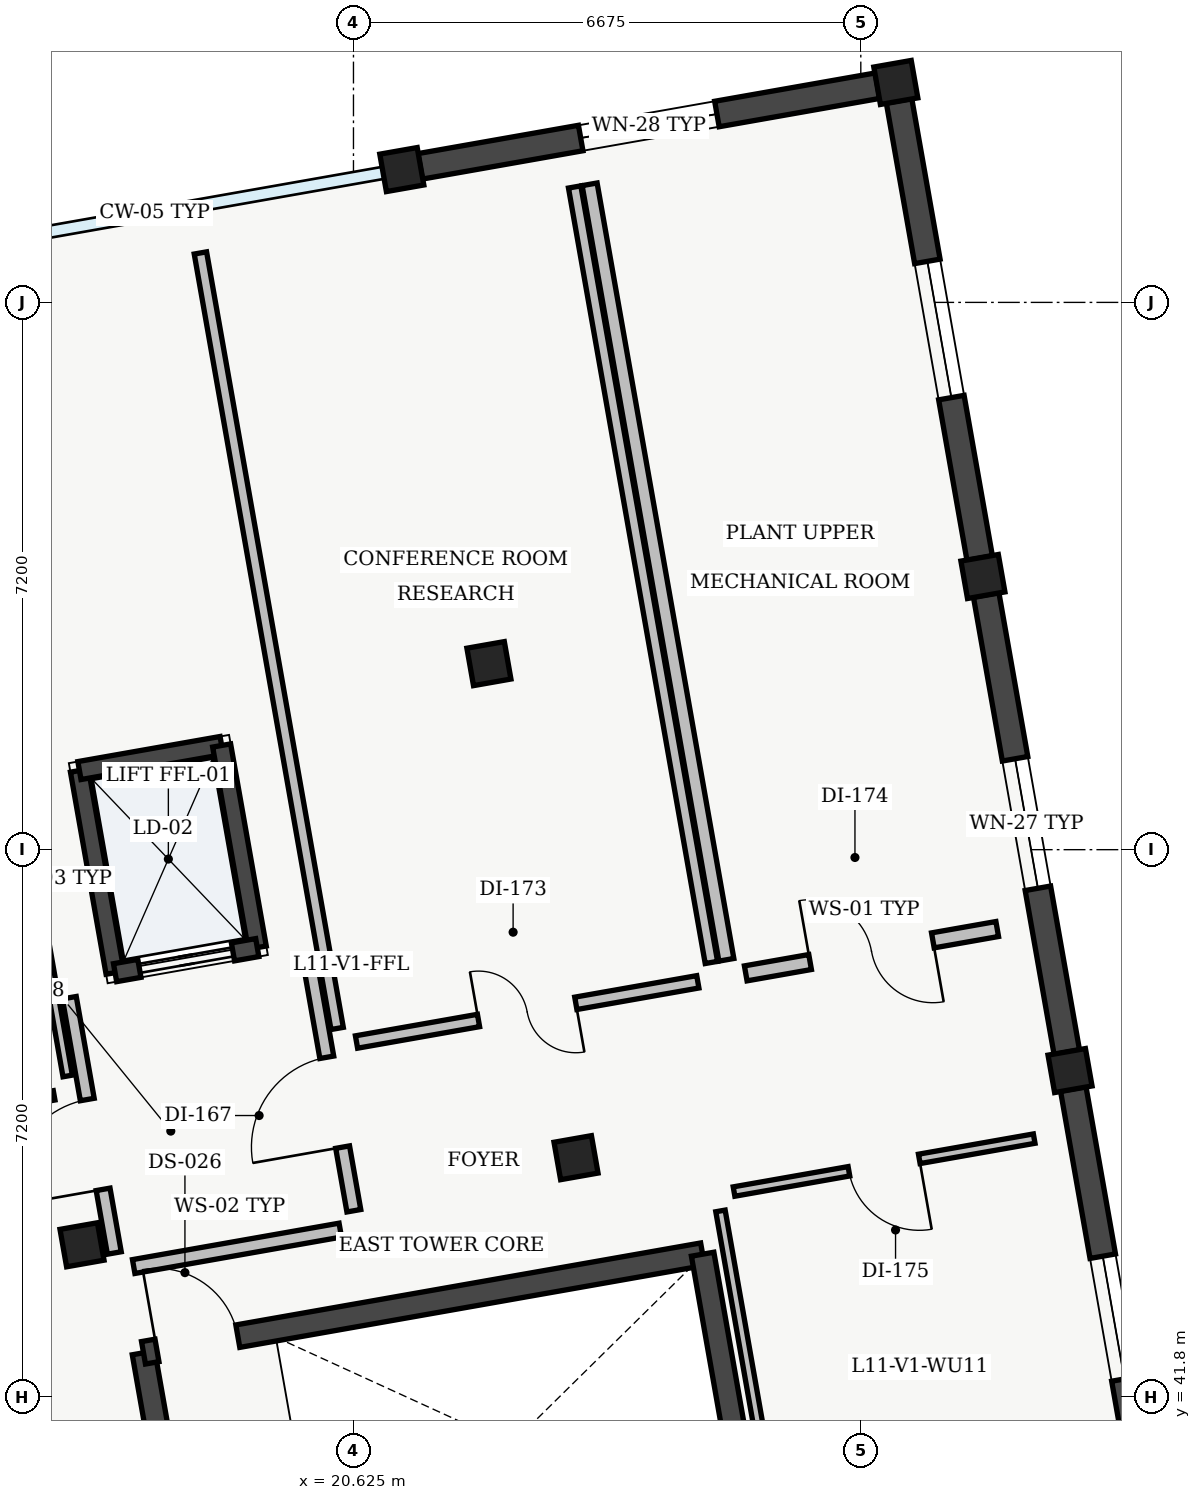
"""IFC4 building model, lengths in metres.
Left out: names, types, materials, properties, quantities, classifications, styles, units other than length and angle.
Written with IfcOpenShell. Run it as: python <this file> out.ifc"""

import sys

from ifc_helpers import new_model, si_unit, direction, frame, frame_2d, origin, origin_2d, place, context, subcontext, project, spatial, polyline, rectangle, outline, extrude, element, fill, save


model = new_model("IFC4")
c1 = context("Model", 3, precision=1e-05, world=origin(), true_north=direction((0.0, 1.0)))
c2 = subcontext(c1, "Body", "Model", "MODEL_VIEW")
j1 = project(units=[si_unit("LENGTHUNIT", "METRE"), si_unit("PLANEANGLEUNIT", "RADIAN")], contexts=[c1])
p1 = place(None, origin())
s1 = spatial("IfcSite", under=j1, at=p1, CompositionType="ELEMENT")
p2 = place(p1, origin())
s2 = spatial("IfcBuilding", under=s1, at=p2, CompositionType="ELEMENT")
p3 = place(p2, frame((0.0, 0.0, 49.2)))
s3 = spatial("IfcBuildingStorey", under=s2, at=p3, CompositionType="ELEMENT", Elevation=49.2)
for number, where, z_axis, x_axis in (
    (1, (17.053, 43.802, 0.0), (0.0, 0.0, 1.0), (0.985, 0.174, 0.0)),
    (2, (23.553, 44.948, 0.0), (0.0, 0.0, 1.0), (0.985, 0.174, 0.0)),
    (3, (22.407, 51.448, 0.0), (0.0, 0.0, 1.0), (0.985, 0.174, 0.0)),
    (4, (21.261, 57.948, 0.0), (0.0, 0.0, 1.0), (0.985, 0.174, 0.0)),
    (5, (30.053, 46.094, 0.0), (0.0, 0.0, 1.0), (0.985, 0.174, 0.0)),
    (6, (28.907, 52.594, 0.0), (0.0, 0.0, 1.0), (0.985, 0.174, 0.0)),
    (7, (27.761, 59.094, 0.0), (0.0, 0.0, 1.0), (0.985, 0.174, 0.0)),
):
    element("IfcColumn", number, at=place(p3, frame(where, z_axis=z_axis, x_axis=x_axis)), inside=s3, PredefinedType="COLUMN", context=c2, shape_type="SweptSolid", body=[
        extrude(rectangle(XDim=0.5, YDim=0.5, at=origin_2d()), origin(), (0.0, 0.0, 1.0), 4.2),
    ])
p4 = place(p3, frame((21.502, 57.99, 0.0), z_axis=(0.0, 0.0, 1.0), x_axis=(0.984807282173, 0.173650847905, 0.0)))
e8 = element("IfcWall", 8, at=p4, inside=s3, PredefinedType="SOLIDWALL", context=c2, shape_type="SweptSolid", body=[
    extrude(rectangle(XDim=6.11, YDim=0.34, at=frame_2d((3.055, 0.0))), origin(), (0.0, 0.0, 1.0), 7.42),
])
p5 = place(p4, frame((2.145, 0.0, 0.95)))
e9 = element("IfcOpeningElement", 9, at=p5, cuts=e8, PredefinedType="OPENING", context=c2, shape_type="SweptSolid", body=[
    extrude(rectangle(XDim=1.82, YDim=1.38, at=frame_2d((0.91, 0.69))), frame((0.0, 0.17, 0.0), z_axis=(0.0, -1.0, 0.0), x_axis=(1.0, 0.0, 0.0)), (0.0, 0.0, 1.0), 0.34),
])
p6 = place(p3, frame((27.803, 58.852, 0.0), z_axis=(0.0, 0.0, 1.0), x_axis=(0.173650847905, -0.984807282173, 0.0)))
e10 = element("IfcWall", 10, at=p6, inside=s3, PredefinedType="SOLIDWALL", context=c2, shape_type="SweptSolid", body=[
    extrude(outline(polyline([(0.0, 0.0), (6.11, 0.0), (6.11, 6.666), (0.0, 7.901), (0.0, 0.0)])), frame((0.0, 0.17, 0.0), z_axis=(0.0, -1.0, 0.0), x_axis=(1.0, 0.0, 0.0)), (0.0, 0.0, 1.0), 0.34),
])
p7 = place(p6, frame((2.145, 0.0, 0.95)))
e11 = element("IfcOpeningElement", 11, at=p7, cuts=e10, PredefinedType="OPENING", context=c2, shape_type="SweptSolid", body=[
    extrude(rectangle(XDim=1.82, YDim=1.38, at=frame_2d((0.91, 0.69))), frame((0.0, 0.17, 0.0), z_axis=(0.0, -1.0, 0.0), x_axis=(1.0, 0.0, 0.0)), (0.0, 0.0, 1.0), 0.34),
])
p8 = place(p3, frame((28.949, 52.353, 0.0), z_axis=(0.0, 0.0, 1.0), x_axis=(0.173650847905, -0.984807282173, 0.0)))
e12 = element("IfcWall", 12, at=p8, inside=s3, PredefinedType="SOLIDWALL", context=c2, shape_type="SweptSolid", body=[
    extrude(outline(polyline([(0.0, 0.0), (6.11, 0.0), (6.11, 5.333), (0.0, 6.567), (0.0, 0.0)])), frame((0.0, 0.17, 0.0), z_axis=(0.0, -1.0, 0.0), x_axis=(1.0, 0.0, 0.0)), (0.0, 0.0, 1.0), 0.34),
])
p9 = place(p8, frame((2.19, 0.0, 0.95)))
e13 = element("IfcOpeningElement", 13, at=p9, cuts=e12, PredefinedType="OPENING", context=c2, shape_type="SweptSolid", body=[
    extrude(rectangle(XDim=1.73, YDim=1.36, at=frame_2d((0.865, 0.68))), frame((0.0, 0.17, 0.0), z_axis=(0.0, -1.0, 0.0), x_axis=(1.0, 0.0, 0.0)), (0.0, 0.0, 1.0), 0.34),
])
p10 = place(p3, frame((30.095, 45.853, 0.0), z_axis=(0.0, 0.0, 1.0), x_axis=(0.173657681232, -0.98480607723, 0.0)))
e14 = element("IfcWall", 14, at=p10, inside=s3, PredefinedType="SOLIDWALL", context=c2, shape_type="SweptSolid", body=[
    extrude(outline(polyline([(0.0, 0.0), (6.11, 0.0), (6.11, 4.0), (0.0, 5.234), (0.0, 0.0)])), frame((0.0, 0.17, 0.0), z_axis=(0.0, -1.0, 0.0), x_axis=(1.0, 0.0, 0.0)), (0.0, 0.0, 1.0), 0.34),
])
p11 = place(p10, frame((2.235, 0.0, 0.95)))
e15 = element("IfcOpeningElement", 15, at=p11, cuts=e14, PredefinedType="OPENING", context=c2, shape_type="SweptSolid", body=[
    extrude(rectangle(XDim=1.64, YDim=1.48, at=frame_2d((0.82, 0.74))), frame((0.0, 0.17, 0.0), z_axis=(0.0, -1.0, 0.0), x_axis=(1.0, 0.0, 0.0)), (0.0, 0.0, 1.0), 0.34),
])
p12 = place(p3, frame((18.567, 38.383, 0.0), z_axis=(0.0, 0.0, 1.0), x_axis=(-0.173606946886, 0.984815022221, 0.0)))
e16 = element("IfcWall", 16, at=p12, inside=s3, PredefinedType="SHEAR", context=c2, shape_type="SweptSolid", body=[
    extrude(rectangle(XDim=4.06, YDim=0.3, at=frame_2d((2.03, 0.0))), origin(), (0.0, 0.0, 1.0), 3.98),
])
p13 = place(p3, frame((17.863, 42.381, 0.0), z_axis=(0.0, 0.0, 1.0), x_axis=(0.984808225754, 0.173645496596, 0.0)))
e17 = element("IfcWall", 17, at=p13, inside=s3, PredefinedType="SHEAR", context=c2, shape_type="SweptSolid", body=[
    extrude(rectangle(XDim=7.47, YDim=0.3, at=frame_2d((3.735, 0.0))), origin(), (0.0, 0.0, 1.0), 3.98),
])
p14 = place(p13, frame((0.18, 0.0, 0.0)))
e18 = element("IfcOpeningElement", 18, at=p14, cuts=e17, PredefinedType="OPENING", context=c2, shape_type="SweptSolid", body=[
    extrude(rectangle(XDim=1.08, YDim=2.15, at=frame_2d((0.54, 1.075))), frame((0.0, 0.15, 0.0), z_axis=(0.0, -1.0, 0.0), x_axis=(1.0, 0.0, 0.0)), (0.0, 0.0, 1.0), 0.3),
])
p15 = place(p3, frame((25.219, 43.678, 0.0), z_axis=(0.0, 0.0, 1.0), x_axis=(0.173665267602, -0.984804739443, 0.0)))
e19 = element("IfcWall", 19, at=p15, inside=s3, PredefinedType="SHEAR", context=c2, shape_type="SweptSolid", body=[
    extrude(rectangle(XDim=4.06, YDim=0.3, at=frame_2d((2.03, 0.0))), origin(), (0.0, 0.0, 1.0), 3.98),
])
p16 = place(p3, frame((17.488, 47.382, 0.0), z_axis=(0.0, 0.0, 1.0), x_axis=(-0.173615102578, 0.98481358447, 0.0)))
e20 = element("IfcWall", 20, at=p16, inside=s3, PredefinedType="SHEAR", context=c2, shape_type="SweptSolid", body=[
    extrude(rectangle(XDim=2.7, YDim=0.24, at=frame_2d((1.35, 0.0))), origin(), (0.0, 0.0, 1.0), 4.35),
])
p17 = place(p3, frame((17.02, 50.041, 0.0), z_axis=(0.0, 0.0, 1.0), x_axis=(0.984815882103, 0.173602068988, 0.0)))
e21 = element("IfcWall", 21, at=p17, inside=s3, PredefinedType="SHEAR", context=c2, shape_type="SweptSolid", body=[
    extrude(rectangle(XDim=1.9, YDim=0.24, at=frame_2d((0.95, 0.0))), origin(), (0.0, 0.0, 1.0), 4.35),
])
p18 = place(p3, frame((18.891, 50.371, 0.0), z_axis=(0.0, 0.0, 1.0), x_axis=(0.173615102578, -0.98481358447, 0.0)))
e22 = element("IfcWall", 22, at=p18, inside=s3, PredefinedType="SHEAR", context=c2, shape_type="SweptSolid", body=[
    extrude(rectangle(XDim=2.7, YDim=0.24, at=frame_2d((1.35, 0.0))), origin(), (0.0, 0.0, 1.0), 4.35),
])
p19 = place(p3, frame((19.359, 47.712, 0.0), z_axis=(0.0, 0.0, 1.0), x_axis=(-0.984815882103, -0.173602068988, 0.0)))
e23 = element("IfcWall", 23, at=p19, inside=s3, PredefinedType="SHEAR", context=c2, shape_type="SweptSolid", body=[
    extrude(rectangle(XDim=1.9, YDim=0.24, at=frame_2d((0.95, 0.0))), origin(), (0.0, 0.0, 1.0), 4.35),
])
p20 = place(p19, frame((0.325, 0.0, 0.0)))
e24 = element("IfcOpeningElement", 24, at=p20, cuts=e23, PredefinedType="OPENING", context=c2, shape_type="SweptSolid", body=[
    extrude(rectangle(XDim=1.25, YDim=2.2, at=frame_2d((0.625, 1.1))), frame((0.0, 0.12, 0.0), z_axis=(0.0, -1.0, 0.0), x_axis=(1.0, 0.0, 0.0)), (0.0, 0.0, 1.0), 0.24),
])
p21 = place(p3, frame((17.733, 43.516, 0.0), z_axis=(0.0, 0.0, 1.0), x_axis=(0.984808483292, 0.173644035992, 0.0)))
e25 = element("IfcWall", 25, at=p21, inside=s3, PredefinedType="SOLIDWALL", context=c2, shape_type="SweptSolid", body=[
    extrude(rectangle(XDim=2.76, YDim=0.185, at=frame_2d((1.38, 0.0))), origin(), (0.0, 0.0, 1.0), 3.65),
])
p22 = place(p3, frame((20.63, 44.25, 0.0), z_axis=(0.0, 0.0, 1.0), x_axis=(-0.173621956536, 0.984812376145, 0.0)))
e26 = element("IfcWall", 26, at=p22, inside=s3, PredefinedType="SOLIDWALL", context=c2, shape_type="SweptSolid", body=[
    extrude(rectangle(XDim=3.41, YDim=0.185, at=frame_2d((1.705, 0.0))), origin(), (0.0, 0.0, 1.0), 3.65),
])
p23 = place(p22, frame((0.85, 0.0, 0.0)))
e27 = element("IfcOpeningElement", 27, at=p23, cuts=e26, PredefinedType="OPENING", context=c2, shape_type="SweptSolid", body=[
    extrude(rectangle(XDim=1.2, YDim=2.15, at=frame_2d((0.6, 1.075))), frame((0.0, 0.093, 0.0), z_axis=(0.0, -1.0, 0.0), x_axis=(1.0, 0.0, 0.0)), (0.0, 0.0, 1.0), 0.185),
])
p24 = place(p3, frame((16.886, 47.052, 0.0), z_axis=(0.0, 0.0, 1.0), x_axis=(0.173621956536, -0.984812376145, 0.0)))
e28 = element("IfcWall", 28, at=p24, inside=s3, PredefinedType="SOLIDWALL", context=c2, shape_type="SweptSolid", body=[
    extrude(rectangle(XDim=3.41, YDim=0.185, at=frame_2d((1.705, 0.0))), origin(), (0.0, 0.0, 1.0), 3.65),
])
p25 = place(p24, frame((1.36, 0.0, 0.0)))
e29 = element("IfcOpeningElement", 29, at=p25, cuts=e28, PredefinedType="OPENING", context=c2, shape_type="SweptSolid", body=[
    extrude(rectangle(XDim=1.2, YDim=2.15, at=frame_2d((0.6, 1.075))), frame((0.0, 0.093, 0.0), z_axis=(0.0, -1.0, 0.0), x_axis=(1.0, 0.0, 0.0)), (0.0, 0.0, 1.0), 0.185),
])
p26 = place(p3, frame((10.423, 44.664, 0.0), z_axis=(0.0, 0.0, 1.0), x_axis=(0.984804420334, 0.173667077165, 0.0)))
e30 = element("IfcWall", 30, at=p26, inside=s3, PredefinedType="PARTITIONING", context=c2, shape_type="SweptSolid", body=[
    extrude(rectangle(XDim=6.36, YDim=0.125, at=frame_2d((3.18, 0.0))), origin(), (0.0, 0.0, 1.0), 3.65),
])
p27 = place(p26, frame((2.71, 0.0, 0.0)))
e31 = element("IfcOpeningElement", 31, at=p27, cuts=e30, PredefinedType="OPENING", context=c2, shape_type="SweptSolid", body=[
    extrude(rectangle(XDim=0.94, YDim=2.12, at=frame_2d((0.47, 1.06))), frame((0.0, 0.062, 0.0), z_axis=(0.0, -1.0, 0.0), x_axis=(1.0, 0.0, 0.0)), (0.0, 0.0, 1.0), 0.125),
])
p28 = place(p3, frame((16.865, 46.023, 0.0), z_axis=(0.0, 0.0, 1.0), x_axis=(-0.173632075677, 0.984810592092, 0.0)))
e32 = element("IfcWall", 32, at=p28, inside=s3, PredefinedType="PARTITIONING", context=c2, shape_type="SweptSolid", body=[
    extrude(rectangle(XDim=10.36, YDim=0.125, at=frame_2d((5.18, 0.0))), origin(), (0.0, 0.0, 1.0), 3.37),
])
p29 = place(p3, frame((20.665, 46.469, 0.0), z_axis=(0.0, 0.0, 1.0), x_axis=(0.984801878875, 0.173681488261, 0.0)))
e33 = element("IfcWall", 33, at=p29, inside=s3, PredefinedType="PARTITIONING", context=c2, shape_type="SweptSolid", body=[
    extrude(rectangle(XDim=4.56, YDim=0.165, at=frame_2d((2.28, 0.0))), origin(), (0.0, 0.0, 1.0), 3.65),
])
p30 = place(p29, frame((1.63, 0.0, 0.0)))
e34 = element("IfcOpeningElement", 34, at=p30, cuts=e33, PredefinedType="OPENING", context=c2, shape_type="SweptSolid", body=[
    extrude(rectangle(XDim=1.3, YDim=2.18, at=frame_2d((0.65, 1.09))), frame((0.0, 0.083, 0.0), z_axis=(0.0, -1.0, 0.0), x_axis=(1.0, 0.0, 0.0)), (0.0, 0.0, 1.0), 0.165),
])
p31 = place(p3, frame((25.334, 47.516, 0.0), z_axis=(0.0, 0.0, 1.0), x_axis=(-0.173658960975, 0.984805851563, 0.0)))
e35 = element("IfcWall", 35, at=p31, inside=s3, PredefinedType="PARTITIONING", context=c2, shape_type="SweptSolid", body=[
    extrude(rectangle(XDim=10.36, YDim=0.165, at=frame_2d((5.18, 0.0))), origin(), (0.0, 0.0, 1.0), 3.65),
])
p32 = place(p3, frame((18.611, 56.851, 0.0), z_axis=(0.0, 0.0, 1.0), x_axis=(0.173654930775, -0.984806562233, 0.0)))
e36 = element("IfcWall", 36, at=p32, inside=s3, PredefinedType="PARTITIONING", context=c2, shape_type="SweptSolid", body=[
    extrude(rectangle(XDim=10.36, YDim=0.165, at=frame_2d((5.18, 0.0))), origin(), (0.0, 0.0, 1.0), 3.65),
])
p33 = place(p3, frame((25.786, 47.373, 0.0), z_axis=(0.0, 0.0, 1.0), x_axis=(0.984804765243, 0.173665121296, 0.0)))
e37 = element("IfcWall", 37, at=p33, inside=s3, PredefinedType="SOLIDWALL", context=c2, shape_type="SweptSolid", body=[
    extrude(rectangle(XDim=3.36, YDim=0.2, at=frame_2d((1.68, 0.0))), origin(), (0.0, 0.0, 1.0), 3.65),
])
p34 = place(p33, frame((0.86, 0.0, 0.0)))
e38 = element("IfcOpeningElement", 38, at=p34, cuts=e37, PredefinedType="OPENING", context=c2, shape_type="SweptSolid", body=[
    extrude(rectangle(XDim=1.64, YDim=2.2, at=frame_2d((0.82, 1.1))), frame((0.0, 0.1, 0.0), z_axis=(0.0, -1.0, 0.0), x_axis=(1.0, 0.0, 0.0)), (0.0, 0.0, 1.0), 0.2),
])
p35 = place(p3, frame((23.732, 57.754, 0.0), z_axis=(0.0, 0.0, 1.0), x_axis=(0.173654930775, -0.984806562233, 0.0)))
e39 = element("IfcWall", 39, at=p35, inside=s3, PredefinedType="SOLIDWALL", context=c2, shape_type="SweptSolid", body=[
    extrude(rectangle(XDim=10.36, YDim=0.2, at=frame_2d((5.18, 0.0))), origin(), (0.0, 0.0, 1.0), 3.65),
])
p36 = place(p3, frame((29.581, 45.198, 0.0), z_axis=(0.0, 0.0, 1.0), x_axis=(-0.984810514369, -0.173632516505, 0.0)))
e40 = element("IfcWall", 40, at=p36, inside=s3, PredefinedType="PARTITIONING", context=c2, shape_type="SweptSolid", body=[
    extrude(rectangle(XDim=4.01, YDim=0.125, at=frame_2d((2.005, 0.0))), origin(), (0.0, 0.0, 1.0), 3.65),
])
p37 = place(p36, frame((1.535, 0.0, 0.0)))
e41 = element("IfcOpeningElement", 41, at=p37, cuts=e40, PredefinedType="OPENING", context=c2, shape_type="SweptSolid", body=[
    extrude(rectangle(XDim=0.94, YDim=2.12, at=frame_2d((0.47, 1.06))), frame((0.0, 0.062, 0.0), z_axis=(0.0, -1.0, 0.0), x_axis=(1.0, 0.0, 0.0)), (0.0, 0.0, 1.0), 0.125),
])
p38 = place(p3, frame((25.454, 44.247, 0.0), z_axis=(0.0, 0.0, 1.0), x_axis=(0.173658971256, -0.98480584975, 0.0)))
e42 = element("IfcWall", 42, at=p38, inside=s3, PredefinedType="PARTITIONING", context=c2, shape_type="SweptSolid", body=[
    extrude(rectangle(XDim=4.96, YDim=0.125, at=frame_2d((2.48, 0.0))), origin(), (0.0, 0.0, 1.0), 3.65),
])
p39 = place(p5, origin())
e43 = element("IfcWindow", 43, at=p39, inside=s3, PartitioningType="SINGLE_PANEL", PredefinedType="WINDOW", context=c2, shape_type="SweptSolid", body=[
    extrude(rectangle(XDim=1.82, YDim=1.38, at=frame_2d((0.91, 0.69))), frame((0.0, 0.03, 0.0), z_axis=(0.0, -1.0, 0.0), x_axis=(1.0, 0.0, 0.0)), (0.0, 0.0, 1.0), 0.06),
])
fill(e9, e43)
p40 = place(p7, origin())
e44 = element("IfcWindow", 44, at=p40, inside=s3, PartitioningType="SINGLE_PANEL", PredefinedType="WINDOW", context=c2, shape_type="SweptSolid", body=[
    extrude(rectangle(XDim=1.82, YDim=1.38, at=frame_2d((0.91, 0.69))), frame((0.0, 0.03, 0.0), z_axis=(0.0, -1.0, 0.0), x_axis=(1.0, 0.0, 0.0)), (0.0, 0.0, 1.0), 0.06),
])
fill(e11, e44)
p41 = place(p9, origin())
e45 = element("IfcWindow", 45, at=p41, inside=s3, PartitioningType="SINGLE_PANEL", PredefinedType="WINDOW", context=c2, shape_type="SweptSolid", body=[
    extrude(rectangle(XDim=1.73, YDim=1.36, at=frame_2d((0.865, 0.68))), frame((0.0, 0.03, 0.0), z_axis=(0.0, -1.0, 0.0), x_axis=(1.0, 0.0, 0.0)), (0.0, 0.0, 1.0), 0.06),
])
fill(e13, e45)
p42 = place(p11, origin())
e46 = element("IfcWindow", 46, at=p42, inside=s3, PartitioningType="SINGLE_PANEL", PredefinedType="WINDOW", context=c2, shape_type="SweptSolid", body=[
    extrude(rectangle(XDim=1.64, YDim=1.48, at=frame_2d((0.82, 0.74))), frame((0.0, 0.03, 0.0), z_axis=(0.0, -1.0, 0.0), x_axis=(1.0, 0.0, 0.0)), (0.0, 0.0, 1.0), 0.06),
])
fill(e15, e46)
p43 = place(p14, origin())
e47 = element("IfcDoor", 47, at=p43, inside=s3, OperationType="SINGLE_SWING_LEFT", PredefinedType="DOOR", context=c2, shape_type="SweptSolid", body=[
    extrude(rectangle(XDim=1.08, YDim=2.15, at=frame_2d((0.54, 1.075))), frame((0.0, 0.025, 0.0), z_axis=(0.0, -1.0, 0.0), x_axis=(1.0, 0.0, 0.0)), (0.0, 0.0, 1.0), 0.05),
])
fill(e18, e47)
p44 = place(p20, origin())
e48 = element("IfcDoor", 48, at=p44, inside=s3, OperationType="SLIDING_TO_RIGHT", PredefinedType="DOOR", context=c2, shape_type="SweptSolid", body=[
    extrude(rectangle(XDim=1.25, YDim=2.2, at=frame_2d((0.625, 1.1))), frame((0.0, 0.025, 0.0), z_axis=(0.0, -1.0, 0.0), x_axis=(1.0, 0.0, 0.0)), (0.0, 0.0, 1.0), 0.05),
])
fill(e24, e48)
p45 = place(p23, origin())
e49 = element("IfcDoor", 49, at=p45, inside=s3, OperationType="SINGLE_SWING_LEFT", PredefinedType="DOOR", context=c2, shape_type="SweptSolid", body=[
    extrude(rectangle(XDim=1.2, YDim=2.15, at=frame_2d((0.6, 1.075))), frame((0.0, 0.025, 0.0), z_axis=(0.0, -1.0, 0.0), x_axis=(1.0, 0.0, 0.0)), (0.0, 0.0, 1.0), 0.05),
])
fill(e27, e49)
p46 = place(p25, origin())
e50 = element("IfcDoor", 50, at=p46, inside=s3, OperationType="SINGLE_SWING_RIGHT", PredefinedType="DOOR", context=c2, shape_type="SweptSolid", body=[
    extrude(rectangle(XDim=1.2, YDim=2.15, at=frame_2d((0.6, 1.075))), frame((0.0, 0.025, 0.0), z_axis=(0.0, -1.0, 0.0), x_axis=(1.0, 0.0, 0.0)), (0.0, 0.0, 1.0), 0.05),
])
fill(e29, e50)
p47 = place(p30, origin())
e51 = element("IfcDoor", 51, at=p47, inside=s3, OperationType="DOUBLE_DOOR_SINGLE_SWING", PredefinedType="DOOR", context=c2, shape_type="SweptSolid", body=[
    extrude(rectangle(XDim=1.3, YDim=2.18, at=frame_2d((0.65, 1.09))), frame((0.0, 0.025, 0.0), z_axis=(0.0, -1.0, 0.0), x_axis=(1.0, 0.0, 0.0)), (0.0, 0.0, 1.0), 0.05),
])
fill(e34, e51)
p48 = place(p34, origin())
e52 = element("IfcDoor", 52, at=p48, inside=s3, OperationType="DOUBLE_DOOR_SINGLE_SWING", PredefinedType="DOOR", context=c2, shape_type="SweptSolid", body=[
    extrude(rectangle(XDim=1.64, YDim=2.2, at=frame_2d((0.82, 1.1))), frame((0.0, 0.025, 0.0), z_axis=(0.0, -1.0, 0.0), x_axis=(1.0, 0.0, 0.0)), (0.0, 0.0, 1.0), 0.05),
])
fill(e38, e52)
p49 = place(p37, origin())
e53 = element("IfcDoor", 53, at=p49, inside=s3, OperationType="SINGLE_SWING_LEFT", PredefinedType="DOOR", context=c2, shape_type="SweptSolid", body=[
    extrude(rectangle(XDim=0.94, YDim=2.12, at=frame_2d((0.47, 1.06))), frame((0.0, 0.025, 0.0), z_axis=(0.0, -1.0, 0.0), x_axis=(1.0, 0.0, 0.0)), (0.0, 0.0, 1.0), 0.05),
])
fill(e41, e53)
save(model, sys.argv[1])
